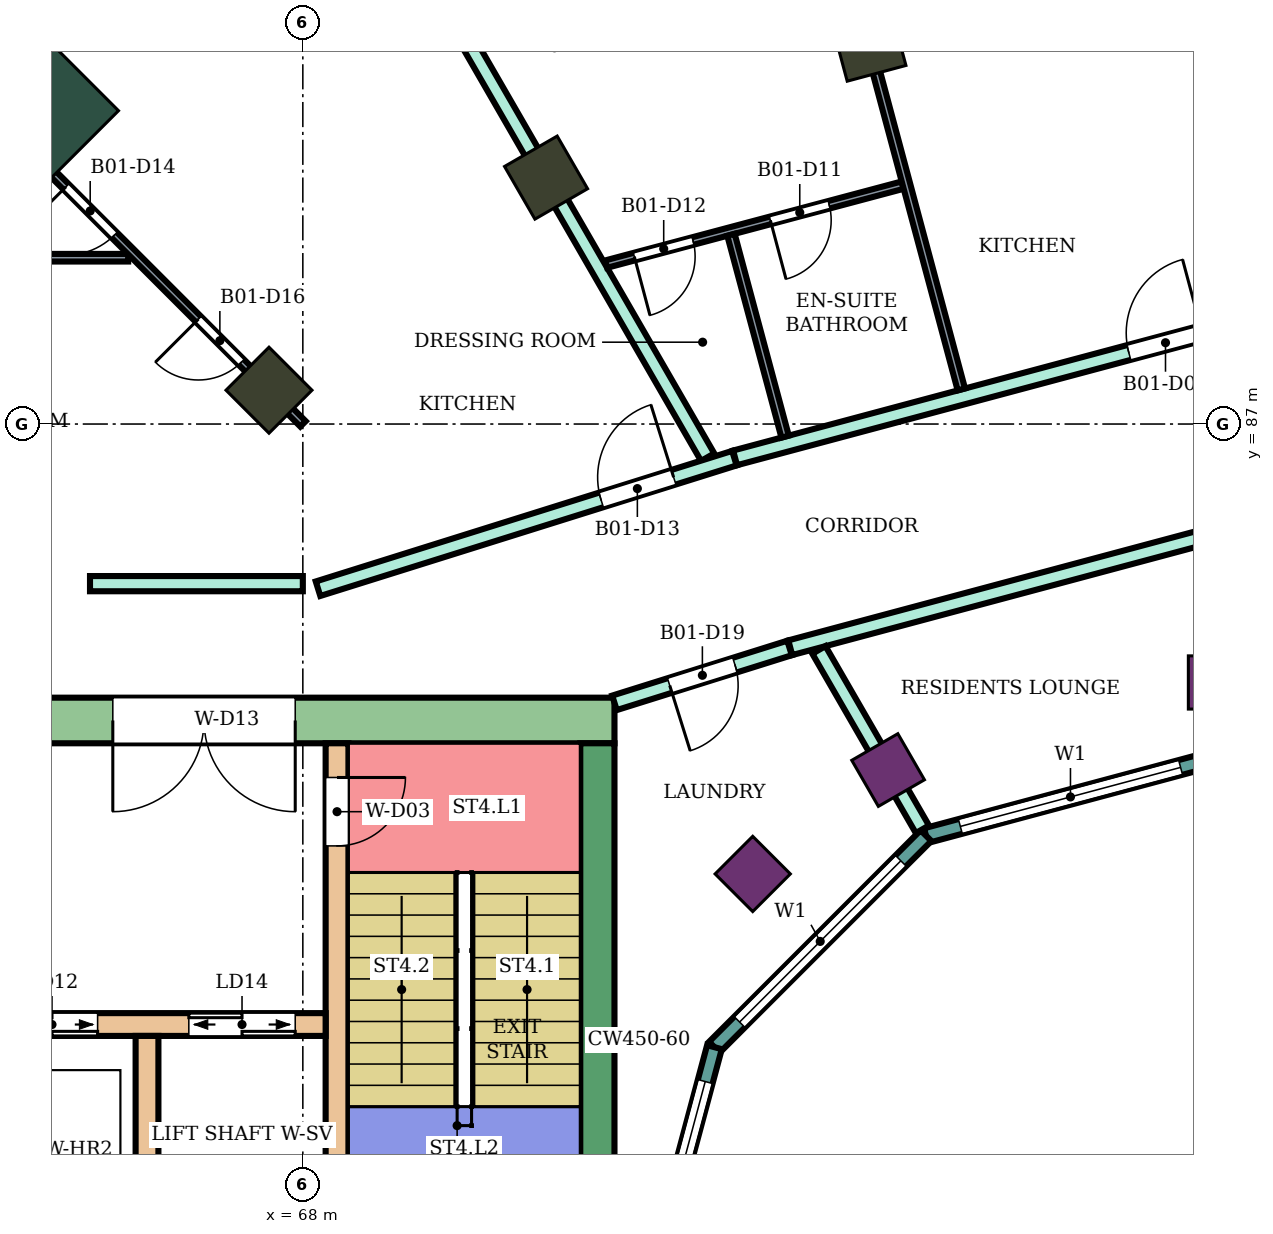
"""IFC4 building model, lengths in metres.
Left out: names, types, materials, properties, quantities, classifications, styles, units other than length and angle.
Written with IfcOpenShell. Run it as: python <this file> out.ifc"""

import sys

from ifc_helpers import new_model, si_unit, direction, frame, frame_2d, origin, origin_2d, place, context, subcontext, project, spatial, rectangle, extrude, element, fill, save


model = new_model("IFC4")
c1 = context("Model", 3, precision=1e-05, world=origin(), true_north=direction((0.0, 1.0)))
c2 = subcontext(c1, "Body", "Model", "MODEL_VIEW")
j1 = project(units=[si_unit("LENGTHUNIT", "METRE"), si_unit("PLANEANGLEUNIT", "RADIAN")], contexts=[c1])
p1 = place(None, origin())
s1 = spatial("IfcSite", under=j1, at=p1, CompositionType="ELEMENT")
p2 = place(p1, origin())
s2 = spatial("IfcBuilding", under=s1, at=p2, CompositionType="ELEMENT")
p3 = place(p2, frame((0.0, 0.0, 216.7)))
s3 = spatial("IfcBuildingStorey", under=s2, at=p3, CompositionType="ELEMENT", Elevation=216.7)
for number, where, z_axis, x_axis in (
    (1, (75.445, 92.0, 0.0), (0.0, 0.0, 1.0), (-0.259, 0.966, 0.0)),
    (2, (71.2, 90.242, 0.0), (0.0, 0.0, 1.0), (-0.5, 0.866, 0.0)),
    (3, (67.555, 87.445, 0.0), (0.0, 0.0, 1.0), (-0.707, 0.707, 0.0)),
):
    element("IfcColumn", number, at=place(p3, frame(where, z_axis=z_axis, x_axis=x_axis)), inside=s3, PredefinedType="COLUMN", context=c2, shape_type="SweptSolid", body=[
        extrude(rectangle(XDim=0.8, YDim=0.8, at=origin_2d()), origin(), (0.0, 0.0, 1.0), 4.2),
    ])
for number, where, z_axis, x_axis in (
    (4, (80.0, 83.6, 0.0), (0.0, 0.0, 1.0), (0.0, 1.0, 0.0)),
    (5, (75.7, 82.448, 0.0), (0.0, 0.0, 1.0), (-0.5, 0.866, 0.0)),
    (6, (73.919, 81.081, 0.0), (0.0, 0.0, 1.0), (-0.707, 0.707, 0.0)),
):
    element("IfcColumn", number, at=place(p3, frame(where, z_axis=z_axis, x_axis=x_axis)), inside=s3, PredefinedType="COLUMN", context=c2, shape_type="SweptSolid", body=[
        extrude(rectangle(XDim=0.7, YDim=0.7, at=origin_2d()), origin(), (0.0, 0.0, 1.0), 4.2),
    ])
p4 = place(p3, frame((64.09, 90.91, 0.0), z_axis=(0.0, 0.0, 1.0), x_axis=(-0.707106781187, 0.707106781187, 0.0)))
e7 = element("IfcColumn", 7, at=p4, inside=s3, PredefinedType="COLUMN", context=c2, shape_type="SweptSolid", body=[
    extrude(rectangle(XDim=1.8, YDim=2.4, at=origin_2d()), origin(), (0.0, 0.0, 1.0), 4.2),
])
p5 = place(p3, frame((72.1, 83.1, 0.0), z_axis=(0.0, 0.0, 1.0), x_axis=(-1.0, 0.0, 0.0)))
e8 = element("IfcWall", 8, at=p5, inside=s3, PredefinedType="SHEAR", context=c2, shape_type="SweptSolid", body=[
    extrude(rectangle(XDim=14.9, YDim=0.6, at=frame_2d((7.45, 0.0))), origin(), (0.0, 0.0, 1.0), 3.88),
])
p6 = place(p5, frame((4.2, 0.0, 0.0)))
e9 = element("IfcOpeningElement", 9, at=p6, cuts=e8, PredefinedType="OPENING", context=c2, shape_type="SweptSolid", body=[
    extrude(rectangle(XDim=2.4, YDim=2.4, at=frame_2d((1.2, 1.2))), frame((0.0, 0.31, 0.0), z_axis=(0.0, -1.0, 0.0), x_axis=(1.0, 0.0, 0.0)), (0.0, 0.0, 1.0), 0.62),
])
p7 = place(p3, frame((71.875, 82.8, 0.0), z_axis=(0.0, 0.0, 1.0), x_axis=(0.0, -1.0, 0.0)))
e10 = element("IfcWall", 10, at=p7, inside=s3, PredefinedType="SHEAR", context=c2, shape_type="SweptSolid", body=[
    extrude(rectangle(XDim=7.8, YDim=0.45, at=frame_2d((3.9, 0.0))), origin(), (0.0, 0.0, 1.0), 3.88),
])
p8 = place(p3, frame((68.45, 82.8, 0.0), z_axis=(0.0, 0.0, 1.0), x_axis=(0.0, -1.0, 0.0)))
e11 = element("IfcWall", 11, at=p8, inside=s3, PredefinedType="SHEAR", context=c2, shape_type="SweptSolid", body=[
    extrude(rectangle(XDim=7.8, YDim=0.3, at=frame_2d((3.9, 0.0))), origin(), (0.0, 0.0, 1.0), 3.88),
])
p9 = place(p8, frame((0.45, 0.0, 0.0)))
e12 = element("IfcOpeningElement", 12, at=p9, cuts=e11, PredefinedType="OPENING", context=c2, shape_type="SweptSolid", body=[
    extrude(rectangle(XDim=0.9, YDim=2.1, at=frame_2d((0.45, 1.05))), frame((0.0, 0.16, 0.0), z_axis=(0.0, -1.0, 0.0), x_axis=(1.0, 0.0, 0.0)), (0.0, 0.0, 1.0), 0.32),
])
p10 = place(p3, frame((68.3, 79.1, 0.0), z_axis=(0.0, 0.0, 1.0), x_axis=(-1.0, 0.0, 0.0)))
e13 = element("IfcWall", 13, at=p10, inside=s3, PredefinedType="SHEAR", context=c2, shape_type="SweptSolid", body=[
    extrude(rectangle(XDim=11.1, YDim=0.3, at=frame_2d((5.55, 0.0))), origin(), (0.0, 0.0, 1.0), 3.88),
])
p11 = place(p10, frame((0.4, 0.0, 0.0)))
e14 = element("IfcOpeningElement", 14, at=p11, cuts=e13, PredefinedType="OPENING", context=c2, shape_type="SweptSolid", body=[
    extrude(rectangle(XDim=1.4, YDim=2.1, at=frame_2d((0.7, 1.05))), frame((0.0, 0.16, 0.0), z_axis=(0.0, -1.0, 0.0), x_axis=(1.0, 0.0, 0.0)), (0.0, 0.0, 1.0), 0.32),
])
p12 = place(p10, frame((3.0, 0.0, 0.0)))
e15 = element("IfcOpeningElement", 15, at=p12, cuts=e13, PredefinedType="OPENING", context=c2, shape_type="SweptSolid", body=[
    extrude(rectangle(XDim=1.2, YDim=2.1, at=frame_2d((0.6, 1.05))), frame((0.0, 0.16, 0.0), z_axis=(0.0, -1.0, 0.0), x_axis=(1.0, 0.0, 0.0)), (0.0, 0.0, 1.0), 0.32),
])
p13 = place(p10, frame((5.77, 0.0, 0.0)))
e16 = element("IfcOpeningElement", 16, at=p13, cuts=e13, PredefinedType="OPENING", context=c2, shape_type="SweptSolid", body=[
    extrude(rectangle(XDim=0.9, YDim=2.1, at=frame_2d((0.45, 1.05))), frame((0.0, 0.16, 0.0), z_axis=(0.0, -1.0, 0.0), x_axis=(1.0, 0.0, 0.0)), (0.0, 0.0, 1.0), 0.32),
])
p14 = place(p10, frame((8.82, 0.0, 0.0)))
e17 = element("IfcOpeningElement", 17, at=p14, cuts=e13, PredefinedType="OPENING", context=c2, shape_type="SweptSolid", body=[
    extrude(rectangle(XDim=0.9, YDim=2.1, at=frame_2d((0.45, 1.05))), frame((0.0, 0.16, 0.0), z_axis=(0.0, -1.0, 0.0), x_axis=(1.0, 0.0, 0.0)), (0.0, 0.0, 1.0), 0.32),
])
p15 = place(p3, frame((65.95, 78.95, 0.0), z_axis=(0.0, 0.0, 1.0), x_axis=(0.0, -1.0, 0.0)))
e18 = element("IfcWall", 18, at=p15, inside=s3, PredefinedType="SHEAR", context=c2, shape_type="SweptSolid", body=[
    extrude(rectangle(XDim=2.55, YDim=0.3, at=frame_2d((1.275, 0.0))), origin(), (0.0, 0.0, 1.0), 3.88),
])
p16 = place(p3, frame((80.0, 82.604, 0.0), z_axis=(0.0, 0.0, 1.0), x_axis=(-0.965933654434, -0.258789828301, 0.0)))
e19 = element("IfcWall", 19, at=p16, inside=s3, PredefinedType="NOTDEFINED", context=c2, shape_type="SweptSolid", body=[
    extrude(rectangle(XDim=3.936, YDim=0.2, at=frame_2d((1.968, 0.0))), origin(), (0.0, 0.0, 1.0), 4.2),
])
p17 = place(p16, frame((0.468, 0.0, 0.9)))
e20 = element("IfcOpeningElement", 20, at=p17, cuts=e19, PredefinedType="OPENING", context=c2, shape_type="SweptSolid", body=[
    extrude(rectangle(XDim=3.0, YDim=2.3, at=frame_2d((1.5, 1.15))), frame((0.0, 0.11, 0.0), z_axis=(0.0, -1.0, 0.0), x_axis=(1.0, 0.0, 0.0)), (0.0, 0.0, 1.0), 0.22),
])
p18 = place(p3, frame((76.198, 81.585, 0.0), z_axis=(0.0, 0.0, 1.0), x_axis=(-0.707106781187, -0.707106781187, 0.0)))
e21 = element("IfcWall", 21, at=p18, inside=s3, PredefinedType="NOTDEFINED", context=c2, shape_type="SweptSolid", body=[
    extrude(rectangle(XDim=3.936, YDim=0.2, at=frame_2d((1.968, 0.0))), origin(), (0.0, 0.0, 1.0), 4.2),
])
p19 = place(p18, frame((0.468, 0.0, 0.9)))
e22 = element("IfcOpeningElement", 22, at=p19, cuts=e21, PredefinedType="OPENING", context=c2, shape_type="SweptSolid", body=[
    extrude(rectangle(XDim=3.0, YDim=2.3, at=frame_2d((1.5, 1.15))), frame((0.0, 0.11, 0.0), z_axis=(0.0, -1.0, 0.0), x_axis=(1.0, 0.0, 0.0)), (0.0, 0.0, 1.0), 0.22),
])
p20 = place(p3, frame((73.415, 78.802, 0.0), z_axis=(0.0, 0.0, 1.0), x_axis=(-0.258789828301, -0.965933654434, 0.0)))
e23 = element("IfcWall", 23, at=p20, inside=s3, PredefinedType="NOTDEFINED", context=c2, shape_type="SweptSolid", body=[
    extrude(rectangle(XDim=3.936, YDim=0.2, at=frame_2d((1.968, 0.0))), origin(), (0.0, 0.0, 1.0), 4.2),
])
p21 = place(p20, frame((0.468, 0.0, 0.9)))
e24 = element("IfcOpeningElement", 24, at=p21, cuts=e23, PredefinedType="OPENING", context=c2, shape_type="SweptSolid", body=[
    extrude(rectangle(XDim=3.0, YDim=2.3, at=frame_2d((1.5, 1.15))), frame((0.0, 0.11, 0.0), z_axis=(0.0, -1.0, 0.0), x_axis=(1.0, 0.0, 0.0)), (0.0, 0.0, 1.0), 0.22),
])
p22 = place(p3, frame((65.2, 84.9, 0.0), z_axis=(0.0, 0.0, 1.0), x_axis=(1.0, 0.0, 0.0)))
e25 = element("IfcWall", 25, at=p22, inside=s3, PredefinedType="PARTITIONING", context=c2, shape_type="SweptSolid", body=[
    extrude(rectangle(XDim=2.8, YDim=0.2, at=frame_2d((1.4, 0.0))), origin(), (0.0, 0.0, 1.0), 3.75),
])
p23 = place(p3, frame((67.105, 97.344, 0.0), z_axis=(0.0, 0.0, 1.0), x_axis=(0.499841888023, -0.866116670534, 0.0)))
e26 = element("IfcWall", 26, at=p23, inside=s3, PredefinedType="PARTITIONING", context=c2, shape_type="SweptSolid", body=[
    extrude(rectangle(XDim=12.446, YDim=0.2, at=frame_2d((6.223, 0.0))), origin(), (0.0, 0.0, 1.0), 3.75),
])
p24 = place(p3, frame((68.2, 84.833, 0.0), z_axis=(0.0, 0.0, 1.0), x_axis=(0.954204109499, 0.299156342762, 0.0)))
e27 = element("IfcWall", 27, at=p24, inside=s3, PredefinedType="PARTITIONING", context=c2, shape_type="SweptSolid", body=[
    extrude(rectangle(XDim=5.74, YDim=0.2, at=frame_2d((2.87, 0.0))), origin(), (0.0, 0.0, 1.0), 3.75),
])
p25 = place(p24, frame((3.903, 0.0, 0.0)))
e28 = element("IfcOpeningElement", 28, at=p25, cuts=e27, PredefinedType="OPENING", context=c2, shape_type="SweptSolid", body=[
    extrude(rectangle(XDim=1.0, YDim=2.1, at=frame_2d((0.5, 1.05))), frame((0.0, 0.11, 0.0), z_axis=(0.0, -1.0, 0.0), x_axis=(1.0, 0.0, 0.0)), (0.0, 0.0, 1.0), 0.22),
])
p26 = place(p3, frame((72.1, 83.332, 0.0), z_axis=(0.0, 0.0, 1.0), x_axis=(0.954233106619, 0.299063836383, 0.0)))
e29 = element("IfcWall", 29, at=p26, inside=s3, PredefinedType="PARTITIONING", context=c2, shape_type="SweptSolid", body=[
    extrude(rectangle(XDim=2.414, YDim=0.2, at=frame_2d((1.207, 0.0))), origin(), (0.0, 0.0, 1.0), 3.75),
])
p27 = place(p26, frame((0.762, 0.0, 0.0)))
e30 = element("IfcOpeningElement", 30, at=p27, cuts=e29, PredefinedType="OPENING", context=c2, shape_type="SweptSolid", body=[
    extrude(rectangle(XDim=0.9, YDim=2.1, at=frame_2d((0.45, 1.05))), frame((0.0, 0.11, 0.0), z_axis=(0.0, -1.0, 0.0), x_axis=(1.0, 0.0, 0.0)), (0.0, 0.0, 1.0), 0.22),
])
p28 = place(p3, frame((73.687, 86.555, 0.0), z_axis=(0.0, 0.0, 1.0), x_axis=(0.966020868517, 0.258464081818, 0.0)))
e31 = element("IfcWall", 31, at=p28, inside=s3, PredefinedType="PARTITIONING", context=c2, shape_type="SweptSolid", body=[
    extrude(rectangle(XDim=6.446, YDim=0.2, at=frame_2d((3.223, 0.0))), origin(), (0.0, 0.0, 1.0), 3.75),
])
p29 = place(p28, frame((5.362, 0.0, 0.0)))
e32 = element("IfcOpeningElement", 32, at=p29, cuts=e31, PredefinedType="OPENING", context=c2, shape_type="SweptSolid", body=[
    extrude(rectangle(XDim=1.0, YDim=2.1, at=frame_2d((0.5, 1.05))), frame((0.0, 0.11, 0.0), z_axis=(0.0, -1.0, 0.0), x_axis=(1.0, 0.0, 0.0)), (0.0, 0.0, 1.0), 0.22),
])
p30 = place(p3, frame((74.413, 84.057, 0.0), z_axis=(0.0, 0.0, 1.0), x_axis=(0.965970849692, 0.258650956976, 0.0)))
e33 = element("IfcWall", 33, at=p30, inside=s3, PredefinedType="PARTITIONING", context=c2, shape_type="SweptSolid", body=[
    extrude(rectangle(XDim=5.734, YDim=0.2, at=frame_2d((2.867, 0.0))), origin(), (0.0, 0.0, 1.0), 3.75),
])
p31 = place(p3, frame((74.79, 84.028, 0.0), z_axis=(0.0, 0.0, 1.0), x_axis=(0.499820708267, -0.866128893172, 0.0)))
e34 = element("IfcWall", 34, at=p31, inside=s3, PredefinedType="PARTITIONING", context=c2, shape_type="SweptSolid", body=[
    extrude(rectangle(XDim=2.725, YDim=0.2, at=frame_2d((1.362, 0.0))), origin(), (0.0, 0.0, 1.0), 3.75),
])
p32 = place(p3, frame((58.6, 89.188, 0.0), z_axis=(0.0, 0.0, 1.0), x_axis=(1.0, 0.0, 0.0)))
e35 = element("IfcWall", 35, at=p32, inside=s3, PredefinedType="PARTITIONING", context=c2, shape_type="SweptSolid", body=[
    extrude(rectangle(XDim=7.102, YDim=0.1, at=frame_2d((3.551, 0.0))), origin(), (0.0, 0.0, 1.0), 3.75),
])
p33 = place(p32, frame((0.965, 0.0, 0.0)))
e36 = element("IfcOpeningElement", 36, at=p33, cuts=e35, PredefinedType="OPENING", context=c2, shape_type="SweptSolid", body=[
    extrude(rectangle(XDim=0.8, YDim=2.1, at=frame_2d((0.4, 1.05))), frame((0.0, 0.06, 0.0), z_axis=(0.0, -1.0, 0.0), x_axis=(1.0, 0.0, 0.0)), (0.0, 0.0, 1.0), 0.12),
])
p34 = place(p3, frame((63.598, 91.408, 0.0), z_axis=(0.0, 0.0, 1.0), x_axis=(0.70693039891, -0.707283119477, 0.0)))
e37 = element("IfcWall", 37, at=p34, inside=s3, PredefinedType="PARTITIONING", context=c2, shape_type="SweptSolid", body=[
    extrude(rectangle(XDim=6.229, YDim=0.1, at=frame_2d((3.115, 0.0))), origin(), (0.0, 0.0, 1.0), 3.75),
])
p35 = place(p34, frame((1.819, 0.0, 0.0)))
e38 = element("IfcOpeningElement", 38, at=p35, cuts=e37, PredefinedType="OPENING", context=c2, shape_type="SweptSolid", body=[
    extrude(rectangle(XDim=0.9, YDim=2.1, at=frame_2d((0.45, 1.05))), frame((0.0, 0.06, 0.0), z_axis=(0.0, -1.0, 0.0), x_axis=(1.0, 0.0, 0.0)), (0.0, 0.0, 1.0), 0.12),
])
p36 = place(p34, frame((4.282, 0.0, 0.0)))
e39 = element("IfcOpeningElement", 39, at=p36, cuts=e37, PredefinedType="OPENING", context=c2, shape_type="SweptSolid", body=[
    extrude(rectangle(XDim=0.8, YDim=2.1, at=frame_2d((0.4, 1.05))), frame((0.0, 0.06, 0.0), z_axis=(0.0, -1.0, 0.0), x_axis=(1.0, 0.0, 0.0)), (0.0, 0.0, 1.0), 0.12),
])
p37 = place(p3, frame((71.991, 89.104, 0.0), z_axis=(0.0, 0.0, 1.0), x_axis=(0.96632826418, 0.257312428472, 0.0)))
e40 = element("IfcWall", 40, at=p37, inside=s3, PredefinedType="PARTITIONING", context=c2, shape_type="SweptSolid", body=[
    extrude(rectangle(XDim=4.035, YDim=0.1, at=frame_2d((2.018, 0.0))), origin(), (0.0, 0.0, 1.0), 3.75),
])
p38 = place(p37, frame((2.235, 0.0, 0.0)))
e41 = element("IfcOpeningElement", 41, at=p38, cuts=e40, PredefinedType="OPENING", context=c2, shape_type="SweptSolid", body=[
    extrude(rectangle(XDim=0.8, YDim=2.1, at=frame_2d((0.4, 1.05))), frame((0.0, 0.06, 0.0), z_axis=(0.0, -1.0, 0.0), x_axis=(1.0, 0.0, 0.0)), (0.0, 0.0, 1.0), 0.12),
])
p39 = place(p37, frame((0.383, 0.0, 0.0)))
e42 = element("IfcOpeningElement", 42, at=p39, cuts=e40, PredefinedType="OPENING", context=c2, shape_type="SweptSolid", body=[
    extrude(rectangle(XDim=0.8, YDim=2.1, at=frame_2d((0.4, 1.05))), frame((0.0, 0.06, 0.0), z_axis=(0.0, -1.0, 0.0), x_axis=(1.0, 0.0, 0.0)), (0.0, 0.0, 1.0), 0.12),
])
p40 = place(p3, frame((73.326, 99.92, 0.0), z_axis=(0.0, 0.0, 1.0), x_axis=(0.258675243249, -0.965964346407, 0.0)))
e43 = element("IfcWall", 43, at=p40, inside=s3, PredefinedType="PARTITIONING", context=c2, shape_type="SweptSolid", body=[
    extrude(rectangle(XDim=12.904, YDim=0.1, at=frame_2d((6.452, 0.0))), origin(), (0.0, 0.0, 1.0), 3.75),
])
p41 = place(p40, frame((4.577, 0.0, 0.0)))
e44 = element("IfcOpeningElement", 44, at=p41, cuts=e43, PredefinedType="OPENING", context=c2, shape_type="SweptSolid", body=[
    extrude(rectangle(XDim=0.9, YDim=2.1, at=frame_2d((0.45, 1.05))), frame((0.0, 0.06, 0.0), z_axis=(0.0, -1.0, 0.0), x_axis=(1.0, 0.0, 0.0)), (0.0, 0.0, 1.0), 0.12),
])
p42 = place(p3, frame((73.633, 89.49, 0.0), z_axis=(0.0, 0.0, 1.0), x_axis=(0.259005329799, -0.965875892201, 0.0)))
e45 = element("IfcWall", 45, at=p42, inside=s3, PredefinedType="PARTITIONING", context=c2, shape_type="SweptSolid", body=[
    extrude(rectangle(XDim=2.75, YDim=0.1, at=frame_2d((1.375, 0.0))), origin(), (0.0, 0.0, 1.0), 3.75),
])
p43 = place(p17, origin())
e46 = element("IfcWindow", 46, at=p43, inside=s3, PartitioningType="SINGLE_PANEL", PredefinedType="WINDOW", context=c2, shape_type="SweptSolid", body=[
    extrude(rectangle(XDim=3.0, YDim=2.3, at=frame_2d((1.5, 1.15))), frame((0.0, 0.03, 0.0), z_axis=(0.0, -1.0, 0.0), x_axis=(1.0, 0.0, 0.0)), (0.0, 0.0, 1.0), 0.06),
])
fill(e20, e46)
p44 = place(p19, origin())
e47 = element("IfcWindow", 47, at=p44, inside=s3, PartitioningType="SINGLE_PANEL", PredefinedType="WINDOW", context=c2, shape_type="SweptSolid", body=[
    extrude(rectangle(XDim=3.0, YDim=2.3, at=frame_2d((1.5, 1.15))), frame((0.0, 0.03, 0.0), z_axis=(0.0, -1.0, 0.0), x_axis=(1.0, 0.0, 0.0)), (0.0, 0.0, 1.0), 0.06),
])
fill(e22, e47)
p45 = place(p21, origin())
e48 = element("IfcWindow", 48, at=p45, inside=s3, PartitioningType="SINGLE_PANEL", PredefinedType="WINDOW", context=c2, shape_type="SweptSolid", body=[
    extrude(rectangle(XDim=3.0, YDim=2.3, at=frame_2d((1.5, 1.15))), frame((0.0, 0.03, 0.0), z_axis=(0.0, -1.0, 0.0), x_axis=(1.0, 0.0, 0.0)), (0.0, 0.0, 1.0), 0.06),
])
fill(e24, e48)
p46 = place(p29, origin())
e49 = element("IfcDoor", 49, at=p46, inside=s3, OperationType="SINGLE_SWING_RIGHT", PredefinedType="DOOR", context=c2, shape_type="SweptSolid", body=[
    extrude(rectangle(XDim=1.0, YDim=2.1, at=frame_2d((0.5, 1.05))), frame((0.0, 0.025, 0.0), z_axis=(0.0, -1.0, 0.0), x_axis=(1.0, 0.0, 0.0)), (0.0, 0.0, 1.0), 0.05),
])
fill(e32, e49)
p47 = place(p38, frame((0.8, 0.0, 0.0), z_axis=(0.0, 0.0, 1.0), x_axis=(-1.0, 0.0, 0.0)))
e50 = element("IfcDoor", 50, at=p47, inside=s3, OperationType="SINGLE_SWING_RIGHT", PredefinedType="DOOR", context=c2, shape_type="SweptSolid", body=[
    extrude(rectangle(XDim=0.8, YDim=2.1, at=frame_2d((0.4, 1.05))), frame((0.0, 0.025, 0.0), z_axis=(0.0, -1.0, 0.0), x_axis=(1.0, 0.0, 0.0)), (0.0, 0.0, 1.0), 0.05),
])
fill(e41, e50)
p48 = place(p39, frame((0.8, 0.0, 0.0), z_axis=(0.0, 0.0, 1.0), x_axis=(-1.0, 0.0, 0.0)))
e51 = element("IfcDoor", 51, at=p48, inside=s3, OperationType="SINGLE_SWING_RIGHT", PredefinedType="DOOR", context=c2, shape_type="SweptSolid", body=[
    extrude(rectangle(XDim=0.8, YDim=2.1, at=frame_2d((0.4, 1.05))), frame((0.0, 0.025, 0.0), z_axis=(0.0, -1.0, 0.0), x_axis=(1.0, 0.0, 0.0)), (0.0, 0.0, 1.0), 0.05),
])
fill(e42, e51)
p49 = place(p25, origin())
e52 = element("IfcDoor", 52, at=p49, inside=s3, OperationType="SINGLE_SWING_RIGHT", PredefinedType="DOOR", context=c2, shape_type="SweptSolid", body=[
    extrude(rectangle(XDim=1.0, YDim=2.1, at=frame_2d((0.5, 1.05))), frame((0.0, 0.025, 0.0), z_axis=(0.0, -1.0, 0.0), x_axis=(1.0, 0.0, 0.0)), (0.0, 0.0, 1.0), 0.05),
])
fill(e28, e52)
p50 = place(p35, frame((0.9, 0.0, 0.0), z_axis=(0.0, 0.0, 1.0), x_axis=(-1.0, 0.0, 0.0)))
e53 = element("IfcDoor", 53, at=p50, inside=s3, OperationType="SINGLE_SWING_RIGHT", PredefinedType="DOOR", context=c2, shape_type="SweptSolid", body=[
    extrude(rectangle(XDim=0.9, YDim=2.1, at=frame_2d((0.45, 1.05))), frame((0.0, 0.025, 0.0), z_axis=(0.0, -1.0, 0.0), x_axis=(1.0, 0.0, 0.0)), (0.0, 0.0, 1.0), 0.05),
])
fill(e38, e53)
p51 = place(p36, frame((0.8, 0.0, 0.0), z_axis=(0.0, 0.0, 1.0), x_axis=(-1.0, 0.0, 0.0)))
e54 = element("IfcDoor", 54, at=p51, inside=s3, OperationType="SINGLE_SWING_RIGHT", PredefinedType="DOOR", context=c2, shape_type="SweptSolid", body=[
    extrude(rectangle(XDim=0.8, YDim=2.1, at=frame_2d((0.4, 1.05))), frame((0.0, 0.025, 0.0), z_axis=(0.0, -1.0, 0.0), x_axis=(1.0, 0.0, 0.0)), (0.0, 0.0, 1.0), 0.05),
])
fill(e39, e54)
p52 = place(p27, frame((0.9, 0.0, 0.0), z_axis=(0.0, 0.0, 1.0), x_axis=(-1.0, 0.0, 0.0)))
e55 = element("IfcDoor", 55, at=p52, inside=s3, OperationType="SINGLE_SWING_RIGHT", PredefinedType="DOOR", context=c2, shape_type="SweptSolid", body=[
    extrude(rectangle(XDim=0.9, YDim=2.1, at=frame_2d((0.45, 1.05))), frame((0.0, 0.025, 0.0), z_axis=(0.0, -1.0, 0.0), x_axis=(1.0, 0.0, 0.0)), (0.0, 0.0, 1.0), 0.05),
])
fill(e30, e55)
p53 = place(p9, origin())
e56 = element("IfcDoor", 56, at=p53, inside=s3, OperationType="SINGLE_SWING_LEFT", PredefinedType="DOOR", context=c2, shape_type="SweptSolid", body=[
    extrude(rectangle(XDim=0.9, YDim=2.1, at=frame_2d((0.45, 1.05))), frame((0.0, 0.025, 0.0), z_axis=(0.0, -1.0, 0.0), x_axis=(1.0, 0.0, 0.0)), (0.0, 0.0, 1.0), 0.05),
])
fill(e12, e56)
p54 = place(p11, origin())
e57 = element("IfcDoor", 57, at=p54, inside=s3, OperationType="DOUBLE_DOOR_SLIDING", PredefinedType="DOOR", context=c2, shape_type="SweptSolid", body=[
    extrude(rectangle(XDim=1.4, YDim=2.1, at=frame_2d((0.7, 1.05))), frame((0.0, 0.025, 0.0), z_axis=(0.0, -1.0, 0.0), x_axis=(1.0, 0.0, 0.0)), (0.0, 0.0, 1.0), 0.05),
])
fill(e14, e57)
p55 = place(p12, origin())
e58 = element("IfcDoor", 58, at=p55, inside=s3, OperationType="DOUBLE_DOOR_SLIDING", PredefinedType="DOOR", context=c2, shape_type="SweptSolid", body=[
    extrude(rectangle(XDim=1.2, YDim=2.1, at=frame_2d((0.6, 1.05))), frame((0.0, 0.025, 0.0), z_axis=(0.0, -1.0, 0.0), x_axis=(1.0, 0.0, 0.0)), (0.0, 0.0, 1.0), 0.05),
])
fill(e15, e58)
p56 = place(p6, origin())
e59 = element("IfcDoor", 59, at=p56, inside=s3, OperationType="DOUBLE_DOOR_SINGLE_SWING", PredefinedType="DOOR", context=c2, shape_type="SweptSolid", body=[
    extrude(rectangle(XDim=2.4, YDim=2.4, at=frame_2d((1.2, 1.2))), frame((0.0, 0.025, 0.0), z_axis=(0.0, -1.0, 0.0), x_axis=(1.0, 0.0, 0.0)), (0.0, 0.0, 1.0), 0.05),
])
fill(e9, e59)
save(model, sys.argv[1])
